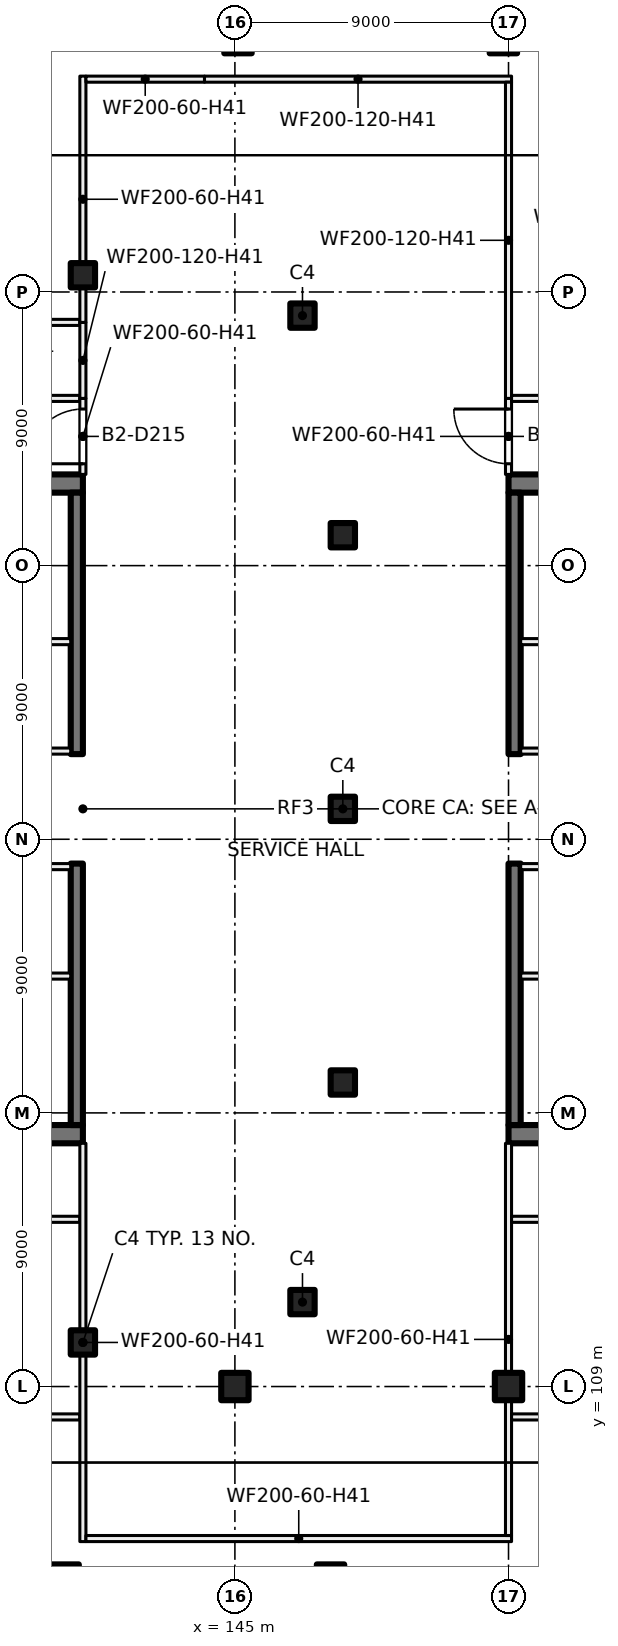
"""IFC4 building model, lengths in metres.
Left out: names, types, materials, properties, quantities, classifications, styles, units other than length and angle.
Written with IfcOpenShell. Run it as: python <this file> out.ifc"""

import sys

from ifc_helpers import new_model, si_unit, direction, frame, frame_2d, origin, origin_2d, place, context, subcontext, project, spatial, rectangle, extrude, element, fill, save


model = new_model("IFC4")
c1 = context("Model", 3, precision=1e-05, world=origin(), true_north=direction((0.0, 1.0)))
c2 = subcontext(c1, "Body", "Model", "MODEL_VIEW")
j1 = project(units=[si_unit("LENGTHUNIT", "METRE"), si_unit("PLANEANGLEUNIT", "RADIAN")], contexts=[c1])
p1 = place(None, origin())
s1 = spatial("IfcSite", under=j1, at=p1, CompositionType="ELEMENT")
p2 = place(p1, origin())
s2 = spatial("IfcBuilding", under=s1, at=p2, CompositionType="ELEMENT")
p3 = place(p2, frame((0.0, 0.0, -9.0)))
s3 = spatial("IfcBuildingStorey", under=s2, at=p3, CompositionType="ELEMENT", Elevation=-9.0)
for number, where, z_axis, x_axis in (
    (1, (145.0, 109.0, 0.0), (0.0, 0.0, 1.0), (1.0, 0.0, 0.0)),
    (2, (154.0, 109.0, 0.0), (0.0, 0.0, 1.0), (1.0, 0.0, 0.0)),
    (3, (145.102, 153.3, 0.0), (0.0, 0.0, 1.0), (1.0, 0.0, 0.0)),
    (4, (153.831, 153.3, 0.0), (0.0, 0.0, 1.0), (1.0, 0.0, 0.0)),
    (5, (148.146, 102.7, 0.0), (0.0, 0.0, 1.0), (1.0, 0.0, 0.0)),
    (6, (139.416, 102.7, 0.0), (0.0, 0.0, 1.0), (1.0, 0.0, 0.0)),
):
    element("IfcColumn", number, at=place(p3, frame(where, z_axis=z_axis, x_axis=x_axis)), inside=s3, PredefinedType="COLUMN", context=c2, shape_type="SweptSolid", body=[
        extrude(rectangle(XDim=0.9, YDim=0.9, at=origin_2d()), origin(), (0.0, 0.0, 1.0), 4.5),
    ])
for number, where, z_axis, x_axis in (
    (7, (148.55, 119.0, 0.0), (0.0, 0.0, 1.0), (1.0, 0.0, 0.0)),
    (8, (148.55, 128.0, 0.0), (0.0, 0.0, 1.0), (1.0, 0.0, 0.0)),
    (9, (148.55, 137.0, 0.0), (0.0, 0.0, 1.0), (1.0, 0.0, 0.0)),
    (10, (140.0, 145.55, 0.0), (0.0, 0.0, 1.0), (1.0, 0.0, 0.0)),
    (11, (147.223, 144.223, 0.0), (0.0, 0.0, 1.0), (1.0, 0.0, 0.0)),
    (12, (140.0, 110.45, 0.0), (0.0, 0.0, 1.0), (1.0, 0.0, 0.0)),
    (13, (147.223, 111.777, 0.0), (0.0, 0.0, 1.0), (1.0, 0.0, 0.0)),
):
    element("IfcColumn", number, at=place(p3, frame(where, z_axis=z_axis, x_axis=x_axis)), inside=s3, PredefinedType="COLUMN", context=c2, shape_type="SweptSolid", body=[
        extrude(rectangle(XDim=0.8, YDim=0.8, at=origin_2d()), origin(), (0.0, 0.0, 1.0), 4.5),
    ])
for number, where, z_axis, x_axis in (
    (14, (135.4, 117.3, 0.0), (0.0, 0.0, 1.0), (1.0, 0.0, 0.0)),
    (15, (135.4, 138.7, 0.0), (0.0, 0.0, 1.0), (1.0, 0.0, 0.0)),
):
    element("IfcWall", number, at=place(p3, frame(where, z_axis=z_axis, x_axis=x_axis)), inside=s3, PredefinedType="SHEAR", context=c2, shape_type="SweptSolid", body=[
        extrude(rectangle(XDim=4.6, YDim=0.6, at=frame_2d((2.3, 0.0))), origin(), (0.0, 0.0, 1.0), 4.5),
    ])
for number, where, z_axis, x_axis in (
    (16, (139.8, 117.6, 0.0), (0.0, 0.0, 1.0), (0.0, 1.0, 0.0)),
    (17, (139.8, 129.8, 0.0), (0.0, 0.0, 1.0), (0.0, 1.0, 0.0)),
):
    element("IfcWall", number, at=place(p3, frame(where, z_axis=z_axis, x_axis=x_axis)), inside=s3, PredefinedType="SHEAR", context=c2, shape_type="SweptSolid", body=[
        extrude(rectangle(XDim=8.6, YDim=0.4, at=frame_2d((4.3, 0.0))), origin(), (0.0, 0.0, 1.0), 4.5),
    ])
for number, where, z_axis, x_axis in (
    (18, (158.6, 138.7, 0.0), (0.0, 0.0, 1.0), (-1.0, 0.0, 0.0)),
    (19, (158.6, 117.3, 0.0), (0.0, 0.0, 1.0), (-1.0, 0.0, 0.0)),
):
    element("IfcWall", number, at=place(p3, frame(where, z_axis=z_axis, x_axis=x_axis)), inside=s3, PredefinedType="SHEAR", context=c2, shape_type="SweptSolid", body=[
        extrude(rectangle(XDim=4.6, YDim=0.6, at=frame_2d((2.3, 0.0))), origin(), (0.0, 0.0, 1.0), 4.5),
    ])
for number, where, z_axis, x_axis in (
    (20, (154.2, 138.4, 0.0), (0.0, 0.0, 1.0), (0.0, -1.0, 0.0)),
    (21, (154.2, 126.2, 0.0), (0.0, 0.0, 1.0), (0.0, -1.0, 0.0)),
):
    element("IfcWall", number, at=place(p3, frame(where, z_axis=z_axis, x_axis=x_axis)), inside=s3, PredefinedType="SHEAR", context=c2, shape_type="SweptSolid", body=[
        extrude(rectangle(XDim=8.6, YDim=0.4, at=frame_2d((4.3, 0.0))), origin(), (0.0, 0.0, 1.0), 4.5),
    ])
p4 = place(p3, frame((135.0, 129.9, 0.0), z_axis=(0.0, 0.0, 1.0), x_axis=(1.0, 0.0, 0.0)))
e22 = element("IfcWall", 22, at=p4, inside=s3, PredefinedType="PARTITIONING", context=c2, shape_type="SweptSolid", body=[
    extrude(rectangle(XDim=4.6, YDim=0.2, at=frame_2d((2.3, 0.0))), origin(), (0.0, 0.0, 1.0), 4.125),
])
p5 = place(p4, frame((1.7, 0.0, 0.0)))
e23 = element("IfcOpeningElement", 23, at=p5, cuts=e22, PredefinedType="OPENING", context=c2, shape_type="SweptSolid", body=[
    extrude(rectangle(XDim=1.2, YDim=2.1, at=frame_2d((0.6, 1.05))), frame((0.0, 0.11, 0.0), z_axis=(0.0, -1.0, 0.0), x_axis=(1.0, 0.0, 0.0)), (0.0, 0.0, 1.0), 0.22),
])
p6 = place(p3, frame((135.0, 133.5, 0.0), z_axis=(0.0, 0.0, 1.0), x_axis=(1.0, 0.0, 0.0)))
e24 = element("IfcWall", 24, at=p6, inside=s3, PredefinedType="PARTITIONING", context=c2, shape_type="SweptSolid", body=[
    extrude(rectangle(XDim=4.6, YDim=0.2, at=frame_2d((2.3, 0.0))), origin(), (0.0, 0.0, 1.0), 4.125),
])
p7 = place(p6, frame((1.75, 0.0, 0.0)))
e25 = element("IfcOpeningElement", 25, at=p7, cuts=e24, PredefinedType="OPENING", context=c2, shape_type="SweptSolid", body=[
    extrude(rectangle(XDim=1.5, YDim=2.1, at=frame_2d((0.75, 1.05))), frame((0.0, 0.11, 0.0), z_axis=(0.0, -1.0, 0.0), x_axis=(1.0, 0.0, 0.0)), (0.0, 0.0, 1.0), 0.22),
])
p8 = place(p3, frame((139.6, 126.1, 0.0), z_axis=(0.0, 0.0, 1.0), x_axis=(-1.0, 0.0, 0.0)))
e26 = element("IfcWall", 26, at=p8, inside=s3, PredefinedType="PARTITIONING", context=c2, shape_type="SweptSolid", body=[
    extrude(rectangle(XDim=4.6, YDim=0.2, at=frame_2d((2.3, 0.0))), origin(), (0.0, 0.0, 1.0), 4.125),
])
p9 = place(p8, frame((1.7, 0.0, 0.0)))
e27 = element("IfcOpeningElement", 27, at=p9, cuts=e26, PredefinedType="OPENING", context=c2, shape_type="SweptSolid", body=[
    extrude(rectangle(XDim=1.2, YDim=2.1, at=frame_2d((0.6, 1.05))), frame((0.0, 0.11, 0.0), z_axis=(0.0, -1.0, 0.0), x_axis=(1.0, 0.0, 0.0)), (0.0, 0.0, 1.0), 0.22),
])
p10 = place(p3, frame((139.6, 122.5, 0.0), z_axis=(0.0, 0.0, 1.0), x_axis=(-1.0, 0.0, 0.0)))
e28 = element("IfcWall", 28, at=p10, inside=s3, PredefinedType="PARTITIONING", context=c2, shape_type="SweptSolid", body=[
    extrude(rectangle(XDim=4.6, YDim=0.2, at=frame_2d((2.3, 0.0))), origin(), (0.0, 0.0, 1.0), 4.125),
])
p11 = place(p10, frame((1.35, 0.0, 0.0)))
e29 = element("IfcOpeningElement", 29, at=p11, cuts=e28, PredefinedType="OPENING", context=c2, shape_type="SweptSolid", body=[
    extrude(rectangle(XDim=1.5, YDim=2.1, at=frame_2d((0.75, 1.05))), frame((0.0, 0.11, 0.0), z_axis=(0.0, -1.0, 0.0), x_axis=(1.0, 0.0, 0.0)), (0.0, 0.0, 1.0), 0.22),
])
p12 = place(p3, frame((163.8, 126.1, 0.0), z_axis=(0.0, 0.0, 1.0), x_axis=(-1.0, 0.0, 0.0)))
e30 = element("IfcWall", 30, at=p12, inside=s3, PredefinedType="PARTITIONING", context=c2, shape_type="SweptSolid", body=[
    extrude(rectangle(XDim=9.4, YDim=0.2, at=frame_2d((4.7, 0.0))), origin(), (0.0, 0.0, 1.0), 4.125),
])
p13 = place(p12, frame((4.1, 0.0, 0.0)))
e31 = element("IfcOpeningElement", 31, at=p13, cuts=e30, PredefinedType="OPENING", context=c2, shape_type="SweptSolid", body=[
    extrude(rectangle(XDim=1.2, YDim=2.1, at=frame_2d((0.6, 1.05))), frame((0.0, 0.11, 0.0), z_axis=(0.0, -1.0, 0.0), x_axis=(1.0, 0.0, 0.0)), (0.0, 0.0, 1.0), 0.22),
])
p14 = place(p3, frame((163.8, 122.5, 0.0), z_axis=(0.0, 0.0, 1.0), x_axis=(-1.0, 0.0, 0.0)))
e32 = element("IfcWall", 32, at=p14, inside=s3, PredefinedType="PARTITIONING", context=c2, shape_type="SweptSolid", body=[
    extrude(rectangle(XDim=9.4, YDim=0.2, at=frame_2d((4.7, 0.0))), origin(), (0.0, 0.0, 1.0), 4.125),
])
p15 = place(p14, frame((6.55, 0.0, 0.0)))
e33 = element("IfcOpeningElement", 33, at=p15, cuts=e32, PredefinedType="OPENING", context=c2, shape_type="SweptSolid", body=[
    extrude(rectangle(XDim=1.5, YDim=2.1, at=frame_2d((0.75, 1.05))), frame((0.0, 0.11, 0.0), z_axis=(0.0, -1.0, 0.0), x_axis=(1.0, 0.0, 0.0)), (0.0, 0.0, 1.0), 0.22),
])
p16 = place(p3, frame((154.4, 129.9, 0.0), z_axis=(0.0, 0.0, 1.0), x_axis=(1.0, 0.0, 0.0)))
e34 = element("IfcWall", 34, at=p16, inside=s3, PredefinedType="PARTITIONING", context=c2, shape_type="SweptSolid", body=[
    extrude(rectangle(XDim=9.4, YDim=0.2, at=frame_2d((4.7, 0.0))), origin(), (0.0, 0.0, 1.0), 4.125),
])
p17 = place(p16, frame((4.1, 0.0, 0.0)))
e35 = element("IfcOpeningElement", 35, at=p17, cuts=e34, PredefinedType="OPENING", context=c2, shape_type="SweptSolid", body=[
    extrude(rectangle(XDim=1.2, YDim=2.1, at=frame_2d((0.6, 1.05))), frame((0.0, 0.11, 0.0), z_axis=(0.0, -1.0, 0.0), x_axis=(1.0, 0.0, 0.0)), (0.0, 0.0, 1.0), 0.22),
])
p18 = place(p3, frame((154.4, 133.5, 0.0), z_axis=(0.0, 0.0, 1.0), x_axis=(1.0, 0.0, 0.0)))
e36 = element("IfcWall", 36, at=p18, inside=s3, PredefinedType="PARTITIONING", context=c2, shape_type="SweptSolid", body=[
    extrude(rectangle(XDim=9.4, YDim=0.2, at=frame_2d((4.7, 0.0))), origin(), (0.0, 0.0, 1.0), 4.125),
])
p19 = place(p18, frame((1.35, 0.0, 0.0)))
e37 = element("IfcOpeningElement", 37, at=p19, cuts=e36, PredefinedType="OPENING", context=c2, shape_type="SweptSolid", body=[
    extrude(rectangle(XDim=1.5, YDim=2.1, at=frame_2d((0.75, 1.05))), frame((0.0, 0.11, 0.0), z_axis=(0.0, -1.0, 0.0), x_axis=(1.0, 0.0, 0.0)), (0.0, 0.0, 1.0), 0.22),
])
for number, where, z_axis, x_axis in (
    (38, (126.1, 108.0, 0.0), (0.0, 0.0, 1.0), (1.0, 0.0, 0.0)),
    (39, (126.1, 144.0, 0.0), (0.0, 0.0, 1.0), (1.0, 0.0, 0.0)),
):
    element("IfcWall", number, at=place(p3, frame(where, z_axis=z_axis, x_axis=x_axis)), inside=s3, PredefinedType="PARTITIONING", context=c2, shape_type="SweptSolid", body=[
        extrude(rectangle(XDim=13.8, YDim=0.2, at=frame_2d((6.9, 0.0))), origin(), (0.0, 0.0, 1.0), 4.125),
    ])
p20 = place(p3, frame((139.9, 114.5, 0.0), z_axis=(0.0, 0.0, 1.0), x_axis=(-1.0, 0.0, 0.0)))
e40 = element("IfcWall", 40, at=p20, inside=s3, PredefinedType="PARTITIONING", context=c2, shape_type="SweptSolid", body=[
    extrude(rectangle(XDim=12.902, YDim=0.2, at=frame_2d((6.451, 0.0))), origin(), (0.0, 0.0, 1.0), 4.125),
])
p21 = place(p20, frame((5.9, 0.0, 0.0)))
e41 = element("IfcOpeningElement", 41, at=p21, cuts=e40, PredefinedType="OPENING", context=c2, shape_type="SweptSolid", body=[
    extrude(rectangle(XDim=1.0, YDim=2.1, at=frame_2d((0.5, 1.05))), frame((0.0, 0.11, 0.0), z_axis=(0.0, -1.0, 0.0), x_axis=(1.0, 0.0, 0.0)), (0.0, 0.0, 1.0), 0.22),
])
p22 = place(p3, frame((126.998, 141.5, 0.0), z_axis=(0.0, 0.0, 1.0), x_axis=(1.0, 0.0, 0.0)))
e42 = element("IfcWall", 42, at=p22, inside=s3, PredefinedType="PARTITIONING", context=c2, shape_type="SweptSolid", body=[
    extrude(rectangle(XDim=12.902, YDim=0.2, at=frame_2d((6.451, 0.0))), origin(), (0.0, 0.0, 1.0), 4.125),
])
p23 = place(p22, frame((6.002, 0.0, 0.0)))
e43 = element("IfcOpeningElement", 43, at=p23, cuts=e42, PredefinedType="OPENING", context=c2, shape_type="SweptSolid", body=[
    extrude(rectangle(XDim=1.0, YDim=2.1, at=frame_2d((0.5, 1.05))), frame((0.0, 0.11, 0.0), z_axis=(0.0, -1.0, 0.0), x_axis=(1.0, 0.0, 0.0)), (0.0, 0.0, 1.0), 0.22),
])
p24 = place(p3, frame((140.0, 103.9, 0.0), z_axis=(0.0, 0.0, 1.0), x_axis=(0.0, 1.0, 0.0)))
e44 = element("IfcWall", 44, at=p24, inside=s3, PredefinedType="PARTITIONING", context=c2, shape_type="SweptSolid", body=[
    extrude(rectangle(XDim=13.1, YDim=0.2, at=frame_2d((6.55, 0.0))), origin(), (0.0, 0.0, 1.0), 4.125),
])
p25 = place(p3, frame((140.1, 104.0, 0.0), z_axis=(0.0, 0.0, 1.0), x_axis=(1.0, 0.0, 0.0)))
e45 = element("IfcWall", 45, at=p25, inside=s3, PredefinedType="PARTITIONING", context=c2, shape_type="SweptSolid", body=[
    extrude(rectangle(XDim=14.0, YDim=0.2, at=frame_2d((7.0, 0.0))), origin(), (0.0, 0.0, 1.0), 4.125),
])
p26 = place(p3, frame((140.0, 139.0, 0.0), z_axis=(0.0, 0.0, 1.0), x_axis=(0.0, 1.0, 0.0)))
e46 = element("IfcWall", 46, at=p26, inside=s3, PredefinedType="PARTITIONING", context=c2, shape_type="SweptSolid", body=[
    extrude(rectangle(XDim=2.5, YDim=0.2, at=frame_2d((1.25, 0.0))), origin(), (0.0, 0.0, 1.0), 4.125),
])
p27 = place(p26, frame((0.35, 0.0, 0.0)))
e47 = element("IfcOpeningElement", 47, at=p27, cuts=e46, PredefinedType="OPENING", context=c2, shape_type="SweptSolid", body=[
    extrude(rectangle(XDim=1.8, YDim=2.1, at=frame_2d((0.9, 1.05))), frame((0.0, 0.11, 0.0), z_axis=(0.0, -1.0, 0.0), x_axis=(1.0, 0.0, 0.0)), (0.0, 0.0, 1.0), 0.22),
])
p28 = place(p3, frame((140.0, 141.5, 0.0), z_axis=(0.0, 0.0, 1.0), x_axis=(0.0, 1.0, 0.0)))
e48 = element("IfcWall", 48, at=p28, inside=s3, PredefinedType="PARTITIONING", context=c2, shape_type="SweptSolid", body=[
    extrude(rectangle(XDim=2.5, YDim=0.2, at=frame_2d((1.25, 0.0))), origin(), (0.0, 0.0, 1.0), 4.125),
])
p29 = place(p3, frame((140.0, 144.0, 0.0), z_axis=(0.0, 0.0, 1.0), x_axis=(0.0, 1.0, 0.0)))
e49 = element("IfcWall", 49, at=p29, inside=s3, PredefinedType="PARTITIONING", context=c2, shape_type="SweptSolid", body=[
    extrude(rectangle(XDim=8.1, YDim=0.2, at=frame_2d((4.05, 0.0))), origin(), (0.0, 0.0, 1.0), 4.125),
])
p30 = place(p3, frame((140.1, 152.0, 0.0), z_axis=(0.0, 0.0, 1.0), x_axis=(1.0, 0.0, 0.0)))
e50 = element("IfcWall", 50, at=p30, inside=s3, PredefinedType="PARTITIONING", context=c2, shape_type="SweptSolid", body=[
    extrude(rectangle(XDim=3.9, YDim=0.2, at=frame_2d((1.95, 0.0))), origin(), (0.0, 0.0, 1.0), 4.125),
])
p31 = place(p3, frame((144.0, 152.0, 0.0), z_axis=(0.0, 0.0, 1.0), x_axis=(1.0, 0.0, 0.0)))
e51 = element("IfcWall", 51, at=p31, inside=s3, PredefinedType="PARTITIONING", context=c2, shape_type="SweptSolid", body=[
    extrude(rectangle(XDim=10.1, YDim=0.2, at=frame_2d((5.05, 0.0))), origin(), (0.0, 0.0, 1.0), 4.125),
])
p32 = place(p3, frame((154.0, 104.1, 0.0), z_axis=(0.0, 0.0, 1.0), x_axis=(0.0, 1.0, 0.0)))
e52 = element("IfcWall", 52, at=p32, inside=s3, PredefinedType="PARTITIONING", context=c2, shape_type="SweptSolid", body=[
    extrude(rectangle(XDim=12.9, YDim=0.2, at=frame_2d((6.45, 0.0))), origin(), (0.0, 0.0, 1.0), 4.125),
])
p33 = place(p3, frame((154.1, 108.0, 0.0), z_axis=(0.0, 0.0, 1.0), x_axis=(1.0, 0.0, 0.0)))
e53 = element("IfcWall", 53, at=p33, inside=s3, PredefinedType="PARTITIONING", context=c2, shape_type="SweptSolid", body=[
    extrude(rectangle(XDim=18.469, YDim=0.2, at=frame_2d((9.234, 0.0))), origin(), (0.0, 0.0, 1.0), 4.125),
])
p34 = place(p3, frame((167.002, 114.5, 0.0), z_axis=(0.0, 0.0, 1.0), x_axis=(-1.0, 0.0, 0.0)))
e54 = element("IfcWall", 54, at=p34, inside=s3, PredefinedType="PARTITIONING", context=c2, shape_type="SweptSolid", body=[
    extrude(rectangle(XDim=12.902, YDim=0.2, at=frame_2d((6.451, 0.0))), origin(), (0.0, 0.0, 1.0), 4.125),
])
p35 = place(p34, frame((8.5, 0.0, 0.0)))
e55 = element("IfcOpeningElement", 55, at=p35, cuts=e54, PredefinedType="OPENING", context=c2, shape_type="SweptSolid", body=[
    extrude(rectangle(XDim=1.0, YDim=2.1, at=frame_2d((0.5, 1.05))), frame((0.0, 0.11, 0.0), z_axis=(0.0, -1.0, 0.0), x_axis=(1.0, 0.0, 0.0)), (0.0, 0.0, 1.0), 0.22),
])
p36 = place(p3, frame((154.0, 141.5, 0.0), z_axis=(0.0, 0.0, 1.0), x_axis=(0.0, -1.0, 0.0)))
e56 = element("IfcWall", 56, at=p36, inside=s3, PredefinedType="PARTITIONING", context=c2, shape_type="SweptSolid", body=[
    extrude(rectangle(XDim=2.5, YDim=0.2, at=frame_2d((1.25, 0.0))), origin(), (0.0, 0.0, 1.0), 4.125),
])
p37 = place(p36, frame((0.35, 0.0, 0.0)))
e57 = element("IfcOpeningElement", 57, at=p37, cuts=e56, PredefinedType="OPENING", context=c2, shape_type="SweptSolid", body=[
    extrude(rectangle(XDim=1.8, YDim=2.1, at=frame_2d((0.9, 1.05))), frame((0.0, 0.11, 0.0), z_axis=(0.0, -1.0, 0.0), x_axis=(1.0, 0.0, 0.0)), (0.0, 0.0, 1.0), 0.22),
])
p38 = place(p3, frame((154.0, 141.5, 0.0), z_axis=(0.0, 0.0, 1.0), x_axis=(0.0, 1.0, 0.0)))
e58 = element("IfcWall", 58, at=p38, inside=s3, PredefinedType="PARTITIONING", context=c2, shape_type="SweptSolid", body=[
    extrude(rectangle(XDim=10.4, YDim=0.2, at=frame_2d((5.2, 0.0))), origin(), (0.0, 0.0, 1.0), 4.125),
])
p39 = place(p3, frame((154.1, 141.5, 0.0), z_axis=(0.0, 0.0, 1.0), x_axis=(1.0, 0.0, 0.0)))
e59 = element("IfcWall", 59, at=p39, inside=s3, PredefinedType="PARTITIONING", context=c2, shape_type="SweptSolid", body=[
    extrude(rectangle(XDim=7.9, YDim=0.2, at=frame_2d((3.95, 0.0))), origin(), (0.0, 0.0, 1.0), 4.125),
])
p40 = place(p27, origin())
e60 = element("IfcDoor", 60, at=p40, inside=s3, OperationType="DOUBLE_DOOR_SINGLE_SWING", PredefinedType="DOOR", context=c2, shape_type="SweptSolid", body=[
    extrude(rectangle(XDim=1.8, YDim=2.1, at=frame_2d((0.9, 1.05))), frame((0.0, 0.025, 0.0), z_axis=(0.0, -1.0, 0.0), x_axis=(1.0, 0.0, 0.0)), (0.0, 0.0, 1.0), 0.05),
])
fill(e47, e60)
p41 = place(p37, origin())
e61 = element("IfcDoor", 61, at=p41, inside=s3, OperationType="DOUBLE_DOOR_SINGLE_SWING", PredefinedType="DOOR", context=c2, shape_type="SweptSolid", body=[
    extrude(rectangle(XDim=1.8, YDim=2.1, at=frame_2d((0.9, 1.05))), frame((0.0, 0.025, 0.0), z_axis=(0.0, -1.0, 0.0), x_axis=(1.0, 0.0, 0.0)), (0.0, 0.0, 1.0), 0.05),
])
fill(e57, e61)
save(model, sys.argv[1])
